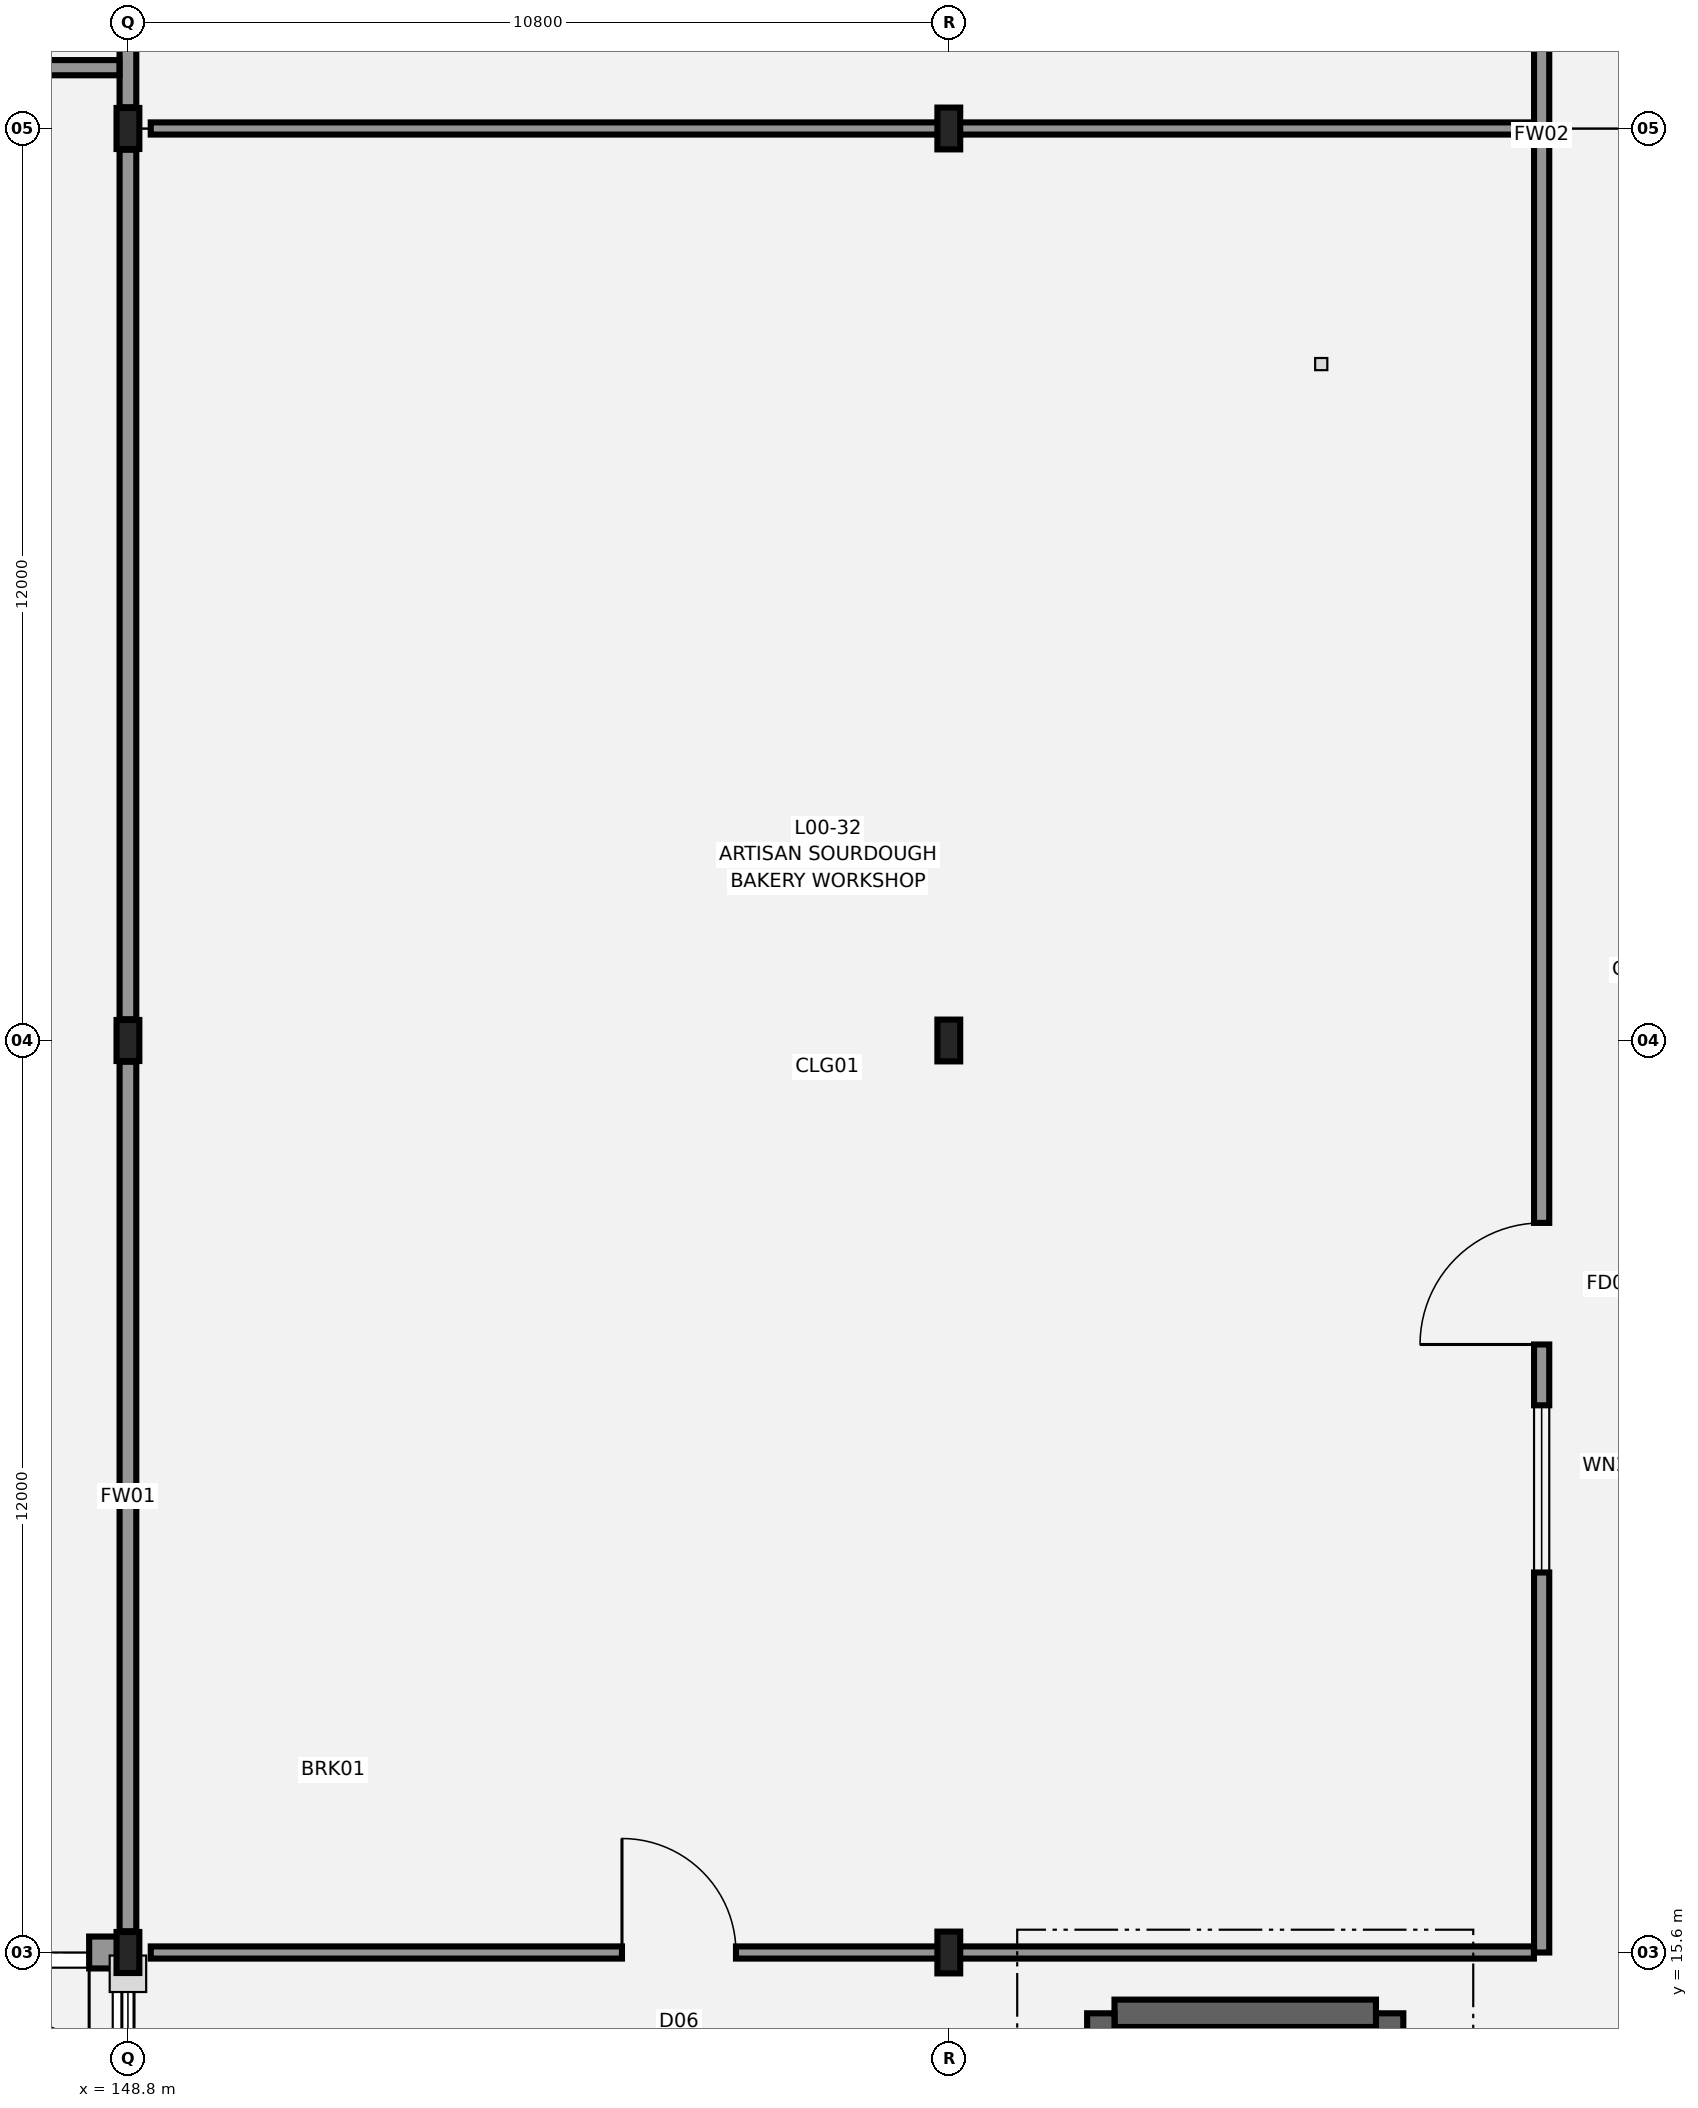
"""IFC4 building model, lengths in metres.
Left out: names, types, materials, properties, quantities, classifications, styles, units other than length and angle.
Written with IfcOpenShell. Run it as: python <this file> out.ifc"""

import sys

from ifc_helpers import new_model, si_unit, direction, frame, frame_2d, origin, origin_2d, place, context, subcontext, project, spatial, rectangle, i_section, extrude, element, fill, save


model = new_model("IFC4")
c1 = context("Model", 3, precision=1e-05, world=origin(), true_north=direction((0.0, 1.0)))
c2 = subcontext(c1, "Body", "Model", "MODEL_VIEW")
j1 = project(units=[si_unit("LENGTHUNIT", "METRE"), si_unit("PLANEANGLEUNIT", "RADIAN")], contexts=[c1])
p1 = place(None, origin())
s1 = spatial("IfcSite", under=j1, at=p1, CompositionType="ELEMENT")
p2 = place(p1, origin())
s2 = spatial("IfcBuilding", under=s1, at=p2, CompositionType="ELEMENT")
p3 = place(p2, origin())
s3 = spatial("IfcBuildingStorey", under=s2, at=p3, CompositionType="ELEMENT", Elevation=0.0)
for number, where, z_axis, x_axis in (
    (1, (148.8, 15.6, 0.0), (0.0, 0.0, 1.0), (1.0, 0.0, 0.0)),
    (2, (148.8, 27.6, 0.0), (0.0, 0.0, 1.0), (1.0, 0.0, 0.0)),
    (3, (148.8, 39.6, 0.0), (0.0, 0.0, 1.0), (1.0, 0.0, 0.0)),
):
    element("IfcColumn", number, at=place(p3, frame(where, z_axis=z_axis, x_axis=x_axis)), inside=s3, PredefinedType="COLUMN", context=c2, shape_type="SweptSolid", body=[
        extrude(i_section(OverallWidth=0.3, OverallDepth=0.54, WebThickness=0.012, FlangeThickness=0.024, FilletRadius=0.027, at=origin_2d()), origin(), (0.0, 0.0, 1.0), 5.4),
    ])
for number, where, z_axis, x_axis in (
    (4, (159.6, 15.6, 0.0), (0.0, 0.0, 1.0), (1.0, 0.0, 0.0)),
    (5, (159.6, 27.6, 0.0), (0.0, 0.0, 1.0), (1.0, 0.0, 0.0)),
    (6, (159.6, 39.6, 0.0), (0.0, 0.0, 1.0), (1.0, 0.0, 0.0)),
):
    element("IfcColumn", number, at=place(p3, frame(where, z_axis=z_axis, x_axis=x_axis)), inside=s3, PredefinedType="COLUMN", context=c2, shape_type="SweptSolid", body=[
        extrude(i_section(OverallWidth=0.3, OverallDepth=0.55, WebThickness=0.015, FlangeThickness=0.029, FilletRadius=0.027, at=origin_2d()), origin(), (0.0, 0.0, 1.0), 5.4),
    ])
p4 = place(p3, frame((165.4, 6.8, 0.0), z_axis=(0.0, 0.0, 1.0), x_axis=(0.0, 1.0, 0.0)))
e7 = element("IfcWall", 7, at=p4, inside=s3, PredefinedType="SHEAR", context=c2, shape_type="SweptSolid", body=[
    extrude(rectangle(XDim=8.0, YDim=0.36, at=frame_2d((4.0, 0.0))), origin(), (0.0, 0.0, 1.0), 5.12),
])
p5 = place(p3, frame((165.22, 14.8, 0.0), z_axis=(0.0, 0.0, 1.0), x_axis=(-1.0, 0.0, 0.0)))
e8 = element("IfcWall", 8, at=p5, inside=s3, PredefinedType="SHEAR", context=c2, shape_type="SweptSolid", body=[
    extrude(rectangle(XDim=3.44, YDim=0.36, at=frame_2d((1.72, 0.0))), origin(), (0.0, 0.0, 1.0), 5.12),
])
p6 = place(p3, frame((161.6, 14.8, 0.0), z_axis=(0.0, 0.0, 1.0), x_axis=(0.0, -1.0, 0.0)))
e9 = element("IfcWall", 9, at=p6, inside=s3, PredefinedType="SHEAR", context=c2, shape_type="SweptSolid", body=[
    extrude(rectangle(XDim=8.0, YDim=0.36, at=frame_2d((4.0, 0.0))), origin(), (0.0, 0.0, 1.0), 5.12),
])
p7 = place(p3, frame((148.79, 15.6, 0.0), z_axis=(0.0, 0.0, 1.0), x_axis=(-1.0, 0.0, 0.0)))
e10 = element("IfcWall", 10, at=p7, inside=s3, PredefinedType="STANDARD", context=c2, shape_type="SweptSolid", body=[
    extrude(rectangle(XDim=3.59, YDim=0.42, at=frame_2d((1.795, 0.0))), origin(), (0.0, 0.0, 1.0), 4.665),
])
p8 = place(p7, frame((0.5, 0.0, 0.0)))
e11 = element("IfcOpeningElement", 11, at=p8, cuts=e10, PredefinedType="OPENING", context=c2, shape_type="SweptSolid", body=[
    extrude(rectangle(XDim=2.2, YDim=2.4, at=frame_2d((1.1, 1.2))), frame((0.0, 0.22, 0.0), z_axis=(0.0, -1.0, 0.0), x_axis=(1.0, 0.0, 0.0)), (0.0, 0.0, 1.0), 0.44),
])
for number, where, z_axis, x_axis in (
    (12, (148.8, 15.88, 0.0), (0.0, 0.0, 1.0), (0.0, 1.0, 0.0)),
    (13, (148.8, 27.88, 0.0), (0.0, 0.0, 1.0), (0.0, 1.0, 0.0)),
):
    element("IfcWall", number, at=place(p3, frame(where, z_axis=z_axis, x_axis=x_axis)), inside=s3, PredefinedType="PARTITIONING", context=c2, shape_type="SweptSolid", body=[
        extrude(rectangle(XDim=11.44, YDim=0.22, at=frame_2d((5.72, 0.0))), origin(), (0.0, 0.0, 1.0), 4.765),
    ])
p9 = place(p3, frame((148.8, 39.88, 0.0), z_axis=(0.0, 0.0, 1.0), x_axis=(0.0, 1.0, 0.0)))
e14 = element("IfcWall", 14, at=p9, inside=s3, PredefinedType="PARTITIONING", context=c2, shape_type="SweptSolid", body=[
    extrude(rectangle(XDim=5.44, YDim=0.22, at=frame_2d((2.72, 0.0))), origin(), (0.0, 0.0, 1.0), 4.765),
])
p10 = place(p3, frame((76.882, 40.4, 0.0), z_axis=(0.0, 0.0, 1.0), x_axis=(1.0, 0.0, 0.0)))
e15 = element("IfcWall", 15, at=p10, inside=s3, PredefinedType="PARTITIONING", context=c2, shape_type="SweptSolid", body=[
    extrude(rectangle(XDim=71.806, YDim=0.2, at=frame_2d((35.903, 0.0))), origin(), (0.0, 0.0, 1.0), 5.04),
])
p11 = place(p10, frame((16.0, 0.0, 0.0)))
e16 = element("IfcOpeningElement", 16, at=p11, cuts=e15, PredefinedType="OPENING", context=c2, shape_type="SweptSolid", body=[
    extrude(rectangle(XDim=1.6, YDim=2.2, at=frame_2d((0.8, 1.1))), frame((0.0, 0.11, 0.0), z_axis=(0.0, -1.0, 0.0), x_axis=(1.0, 0.0, 0.0)), (0.0, 0.0, 1.0), 0.22),
])
p12 = place(p10, frame((40.0, 0.0, 0.0)))
e17 = element("IfcOpeningElement", 17, at=p12, cuts=e15, PredefinedType="OPENING", context=c2, shape_type="SweptSolid", body=[
    extrude(rectangle(XDim=1.6, YDim=2.2, at=frame_2d((0.8, 1.1))), frame((0.0, 0.11, 0.0), z_axis=(0.0, -1.0, 0.0), x_axis=(1.0, 0.0, 0.0)), (0.0, 0.0, 1.0), 0.22),
])
p13 = place(p10, frame((53.0, 0.0, 0.0)))
e18 = element("IfcOpeningElement", 18, at=p13, cuts=e15, PredefinedType="OPENING", context=c2, shape_type="SweptSolid", body=[
    extrude(rectangle(XDim=1.2, YDim=2.2, at=frame_2d((0.6, 1.1))), frame((0.0, 0.11, 0.0), z_axis=(0.0, -1.0, 0.0), x_axis=(1.0, 0.0, 0.0)), (0.0, 0.0, 1.0), 0.22),
])
p14 = place(p10, frame((63.0, 0.0, 0.0)))
e19 = element("IfcOpeningElement", 19, at=p14, cuts=e15, PredefinedType="OPENING", context=c2, shape_type="SweptSolid", body=[
    extrude(rectangle(XDim=1.02, YDim=2.12, at=frame_2d((0.51, 1.06))), frame((0.0, 0.11, 0.0), z_axis=(0.0, -1.0, 0.0), x_axis=(1.0, 0.0, 0.0)), (0.0, 0.0, 1.0), 0.22),
])
p15 = place(p10, frame((67.4, 0.0, 0.0)))
e20 = element("IfcOpeningElement", 20, at=p15, cuts=e15, PredefinedType="OPENING", context=c2, shape_type="SweptSolid", body=[
    extrude(rectangle(XDim=1.0, YDim=2.1, at=frame_2d((0.5, 1.05))), frame((0.0, 0.11, 0.0), z_axis=(0.0, -1.0, 0.0), x_axis=(1.0, 0.0, 0.0)), (0.0, 0.0, 1.0), 0.22),
])
p16 = place(p3, frame((167.4, 15.6, 0.0), z_axis=(0.0, 0.0, 1.0), x_axis=(0.0, 1.0, 0.0)))
e21 = element("IfcWall", 21, at=p16, inside=s3, PredefinedType="PARTITIONING", context=c2, shape_type="SweptSolid", body=[
    extrude(rectangle(XDim=47.828, YDim=0.2, at=frame_2d((23.914, 0.0))), origin(), (0.0, 0.0, 1.0), 5.04),
])
p17 = place(p16, frame((8.0, 0.0, 0.0)))
e22 = element("IfcOpeningElement", 22, at=p17, cuts=e21, PredefinedType="OPENING", context=c2, shape_type="SweptSolid", body=[
    extrude(rectangle(XDim=1.6, YDim=2.2, at=frame_2d((0.8, 1.1))), frame((0.0, 0.11, 0.0), z_axis=(0.0, -1.0, 0.0), x_axis=(1.0, 0.0, 0.0)), (0.0, 0.0, 1.0), 0.22),
])
p18 = place(p16, frame((32.0, 0.0, 0.0)))
e23 = element("IfcOpeningElement", 23, at=p18, cuts=e21, PredefinedType="OPENING", context=c2, shape_type="SweptSolid", body=[
    extrude(rectangle(XDim=1.6, YDim=2.2, at=frame_2d((0.8, 1.1))), frame((0.0, 0.11, 0.0), z_axis=(0.0, -1.0, 0.0), x_axis=(1.0, 0.0, 0.0)), (0.0, 0.0, 1.0), 0.22),
])
p19 = place(p16, frame((5.0, 0.0, 1.05)))
e24 = element("IfcOpeningElement", 24, at=p19, cuts=e21, PredefinedType="OPENING", context=c2, shape_type="SweptSolid", body=[
    extrude(rectangle(XDim=2.2, YDim=1.3, at=frame_2d((1.1, 0.65))), frame((0.0, 0.11, 0.0), z_axis=(0.0, -1.0, 0.0), x_axis=(1.0, 0.0, 0.0)), (0.0, 0.0, 1.0), 0.22),
])
p20 = place(p3, frame((149.1, 15.6, 0.0), z_axis=(0.0, 0.0, 1.0), x_axis=(1.0, 0.0, 0.0)))
e25 = element("IfcWall", 25, at=p20, inside=s3, PredefinedType="PARTITIONING", context=c2, shape_type="SweptSolid", body=[
    extrude(rectangle(XDim=18.198, YDim=0.16, at=frame_2d((9.099, 0.0))), origin(), (0.0, 0.0, 1.0), 4.665),
])
p21 = place(p20, frame((6.2, 0.0, 0.0)))
e26 = element("IfcOpeningElement", 26, at=p21, cuts=e25, PredefinedType="OPENING", context=c2, shape_type="SweptSolid", body=[
    extrude(rectangle(XDim=1.5, YDim=2.15, at=frame_2d((0.75, 1.075))), frame((0.0, 0.09, 0.0), z_axis=(0.0, -1.0, 0.0), x_axis=(1.0, 0.0, 0.0)), (0.0, 0.0, 1.0), 0.18),
])
p22 = place(p3, frame((149.1, 39.6, 0.0), z_axis=(0.0, 0.0, 1.0), x_axis=(1.0, 0.0, 0.0)))
e27 = element("IfcWall", 27, at=p22, inside=s3, PredefinedType="PARTITIONING", context=c2, shape_type="SweptSolid", body=[
    extrude(rectangle(XDim=18.198, YDim=0.16, at=frame_2d((9.099, 0.0))), origin(), (0.0, 0.0, 1.0), 4.665),
])
p23 = place(p8, origin())
e28 = element("IfcDoor", 28, at=p23, inside=s3, OperationType="DOUBLE_DOOR_SINGLE_SWING", PredefinedType="DOOR", context=c2, shape_type="SweptSolid", body=[
    extrude(rectangle(XDim=2.2, YDim=2.4, at=frame_2d((1.1, 1.2))), frame((0.0, 0.025, 0.0), z_axis=(0.0, -1.0, 0.0), x_axis=(1.0, 0.0, 0.0)), (0.0, 0.0, 1.0), 0.05),
])
fill(e11, e28)
p24 = place(p17, origin())
e29 = element("IfcDoor", 29, at=p24, inside=s3, OperationType="SINGLE_SWING_LEFT", PredefinedType="DOOR", context=c2, shape_type="SweptSolid", body=[
    extrude(rectangle(XDim=1.6, YDim=2.2, at=frame_2d((0.8, 1.1))), frame((0.0, 0.025, 0.0), z_axis=(0.0, -1.0, 0.0), x_axis=(1.0, 0.0, 0.0)), (0.0, 0.0, 1.0), 0.05),
])
fill(e22, e29)
p25 = place(p21, origin())
e30 = element("IfcDoor", 30, at=p25, inside=s3, OperationType="SINGLE_SWING_LEFT", PredefinedType="DOOR", context=c2, shape_type="SweptSolid", body=[
    extrude(rectangle(XDim=1.5, YDim=2.15, at=frame_2d((0.75, 1.075))), frame((0.0, 0.025, 0.0), z_axis=(0.0, -1.0, 0.0), x_axis=(1.0, 0.0, 0.0)), (0.0, 0.0, 1.0), 0.05),
])
fill(e26, e30)
p26 = place(p19, origin())
e31 = element("IfcWindow", 31, at=p26, inside=s3, PartitioningType="SINGLE_PANEL", PredefinedType="WINDOW", context=c2, shape_type="SweptSolid", body=[
    extrude(rectangle(XDim=2.2, YDim=1.3, at=frame_2d((1.1, 0.65))), frame((0.0, 0.03, 0.0), z_axis=(0.0, -1.0, 0.0), x_axis=(1.0, 0.0, 0.0)), (0.0, 0.0, 1.0), 0.06),
])
fill(e24, e31)
save(model, sys.argv[1])
